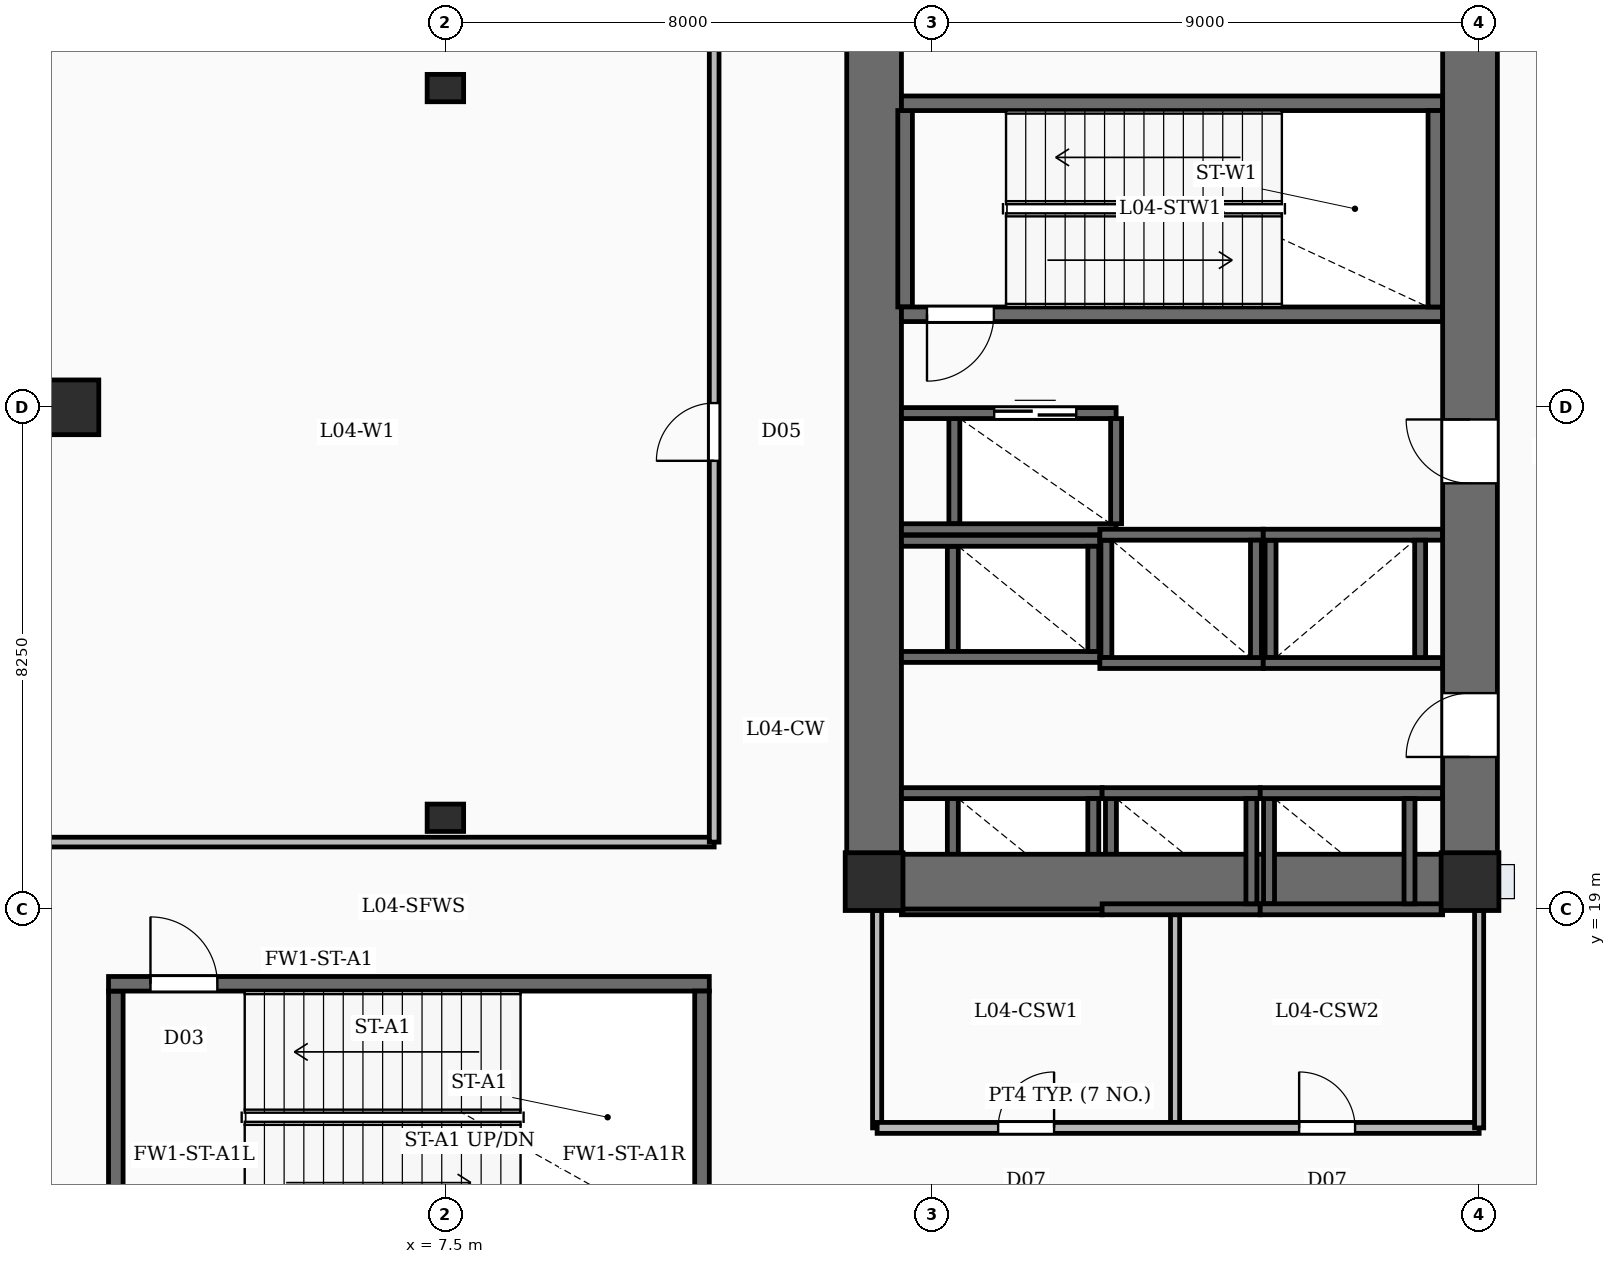
"""IFC4 building model, lengths in metres.
Left out: names, types, materials, properties, quantities, classifications, styles, units other than length and angle.
Written with IfcOpenShell. Run it as: python <this file> out.ifc"""

import sys

from ifc_helpers import new_model, si_unit, direction, frame, frame_2d, origin, origin_2d, place, context, subcontext, project, spatial, rectangle, extrude, element, fill, save


model = new_model("IFC4")
c1 = context("Model", 3, precision=1e-05, world=origin(), true_north=direction((0.0, 1.0)))
c2 = subcontext(c1, "Body", "Model", "MODEL_VIEW")
j1 = project(units=[si_unit("LENGTHUNIT", "METRE"), si_unit("PLANEANGLEUNIT", "RADIAN")], contexts=[c1])
p1 = place(None, origin())
s1 = spatial("IfcSite", under=j1, at=p1, CompositionType="ELEMENT")
p2 = place(p1, origin())
s2 = spatial("IfcBuilding", under=s1, at=p2, CompositionType="ELEMENT")
p3 = place(p2, frame((0.0, 0.0, 23.0)))
s3 = spatial("IfcBuildingStorey", under=s2, at=p3, CompositionType="ELEMENT", Elevation=23.0)
p4 = place(p3, frame((14.55, 19.0, -0.35), z_axis=(0.0, 0.0, 1.0), x_axis=(0.0, 1.0, 0.0)))
e1 = element("IfcWall", 1, at=p4, inside=s3, PredefinedType="SHEAR", context=c2, shape_type="SweptSolid", body=[
    extrude(rectangle(XDim=15.3, YDim=0.9, at=frame_2d((7.65, 0.0))), origin(), (0.0, 0.0, 1.0), 5.0),
])
p5 = place(p3, frame((24.35, 19.0, -0.35), z_axis=(0.0, 0.0, 1.0), x_axis=(0.0, 1.0, 0.0)))
e2 = element("IfcWall", 2, at=p5, inside=s3, PredefinedType="SHEAR", context=c2, shape_type="SweptSolid", body=[
    extrude(rectangle(XDim=15.3, YDim=0.9, at=frame_2d((7.65, 0.0))), origin(), (0.0, 0.0, 1.0), 5.0),
])
p6 = place(p5, frame((2.5, 0.0, 0.35)))
e3 = element("IfcOpeningElement", 3, at=p6, cuts=e2, PredefinedType="OPENING", context=c2, shape_type="SweptSolid", body=[
    extrude(rectangle(XDim=1.05, YDim=2.15, at=frame_2d((0.525, 1.075))), frame((0.0, 0.46, 0.0), z_axis=(0.0, -1.0, 0.0), x_axis=(1.0, 0.0, 0.0)), (0.0, 0.0, 1.0), 0.92),
])
p7 = place(p5, frame((7.0, 0.0, 0.35)))
e4 = element("IfcOpeningElement", 4, at=p7, cuts=e2, PredefinedType="OPENING", context=c2, shape_type="SweptSolid", body=[
    extrude(rectangle(XDim=1.05, YDim=2.15, at=frame_2d((0.525, 1.075))), frame((0.0, 0.46, 0.0), z_axis=(0.0, -1.0, 0.0), x_axis=(1.0, 0.0, 0.0)), (0.0, 0.0, 1.0), 0.92),
])
p8 = place(p3, frame((15.0, 19.45, -0.35), z_axis=(0.0, 0.0, 1.0), x_axis=(1.0, 0.0, 0.0)))
e5 = element("IfcWall", 5, at=p8, inside=s3, PredefinedType="SHEAR", context=c2, shape_type="SweptSolid", body=[
    extrude(rectangle(XDim=8.9, YDim=0.9, at=frame_2d((4.45, 0.0))), origin(), (0.0, 0.0, 1.0), 5.0),
])
for number, where, z_axis, x_axis in (
    (6, (14.55, 19.45, -0.35), (0.0, 0.0, 1.0), (1.0, 0.0, 0.0)),
    (7, (24.35, 19.45, -0.35), (0.0, 0.0, 1.0), (1.0, 0.0, 0.0)),
):
    element("IfcColumn", number, at=place(p3, frame(where, z_axis=z_axis, x_axis=x_axis)), inside=s3, PredefinedType="COLUMN", context=c2, shape_type="SweptSolid", body=[
        extrude(rectangle(XDim=0.95, YDim=0.95, at=origin_2d()), origin(), (0.0, 0.0, 1.0), 5.0),
    ])
p9 = place(p3, frame((1.2, 27.25, -0.35), z_axis=(0.0, 0.0, 1.0), x_axis=(1.0, 0.0, 0.0)))
e8 = element("IfcColumn", 8, at=p9, inside=s3, PredefinedType="COLUMN", context=c2, shape_type="SweptSolid", body=[
    extrude(rectangle(XDim=1.2, YDim=0.9, at=origin_2d()), origin(), (0.0, 0.0, 1.0), 5.0),
])
for number, where, z_axis, x_axis in (
    (9, (7.5, 20.5, -0.35), (0.0, 0.0, 1.0), (1.0, 0.0, 0.0)),
    (10, (7.5, 32.5, -0.35), (0.0, 0.0, 1.0), (1.0, 0.0, 0.0)),
):
    element("IfcColumn", number, at=place(p3, frame(where, z_axis=z_axis, x_axis=x_axis)), inside=s3, PredefinedType="PILASTER", context=c2, shape_type="SweptSolid", body=[
        extrude(rectangle(XDim=0.6, YDim=0.45, at=origin_2d()), origin(), (0.0, 0.0, 1.0), 5.0),
    ])
p10 = place(p3, frame((1.96, 17.77, 0.0), z_axis=(0.0, 0.0, 1.0), x_axis=(1.0, 0.0, 0.0)))
e11 = element("IfcWall", 11, at=p10, inside=s3, PredefinedType="SOLIDWALL", context=c2, shape_type="SweptSolid", body=[
    extrude(rectangle(XDim=9.88, YDim=0.24, at=frame_2d((4.94, 0.0))), origin(), (0.0, 0.0, 1.0), 4.65),
])
p11 = place(p10, frame((0.69, 0.0, 0.0)))
e12 = element("IfcOpeningElement", 12, at=p11, cuts=e11, PredefinedType="OPENING", context=c2, shape_type="SweptSolid", body=[
    extrude(rectangle(XDim=1.1, YDim=2.15, at=frame_2d((0.55, 1.075))), frame((0.0, 0.13, 0.0), z_axis=(0.0, -1.0, 0.0), x_axis=(1.0, 0.0, 0.0)), (0.0, 0.0, 1.0), 0.26),
])
for number, where, z_axis, x_axis in (
    (13, (2.08, 13.5, 0.0), (0.0, 0.0, 1.0), (0.0, 1.0, 0.0)),
    (14, (11.72, 13.5, 0.0), (0.0, 0.0, 1.0), (0.0, 1.0, 0.0)),
):
    element("IfcWall", number, at=place(p3, frame(where, z_axis=z_axis, x_axis=x_axis)), inside=s3, PredefinedType="SOLIDWALL", context=c2, shape_type="SweptSolid", body=[
        extrude(rectangle(XDim=4.15, YDim=0.24, at=frame_2d((2.075, 0.0))), origin(), (0.0, 0.0, 1.0), 4.65),
    ])
p12 = place(p3, frame((23.9, 28.78, 0.0), z_axis=(0.0, 0.0, 1.0), x_axis=(-1.0, 0.0, 0.0)))
e15 = element("IfcWall", 15, at=p12, inside=s3, PredefinedType="SOLIDWALL", context=c2, shape_type="SweptSolid", body=[
    extrude(rectangle(XDim=8.9, YDim=0.24, at=frame_2d((4.45, 0.0))), origin(), (0.0, 0.0, 1.0), 4.65),
])
p13 = place(p12, frame((7.38, 0.0, 0.0)))
e16 = element("IfcOpeningElement", 16, at=p13, cuts=e15, PredefinedType="OPENING", context=c2, shape_type="SweptSolid", body=[
    extrude(rectangle(XDim=1.1, YDim=2.15, at=frame_2d((0.55, 1.075))), frame((0.0, 0.13, 0.0), z_axis=(0.0, -1.0, 0.0), x_axis=(1.0, 0.0, 0.0)), (0.0, 0.0, 1.0), 0.26),
])
p14 = place(p3, frame((15.0, 32.25, 0.0), z_axis=(0.0, 0.0, 1.0), x_axis=(1.0, 0.0, 0.0)))
e17 = element("IfcWall", 17, at=p14, inside=s3, PredefinedType="SOLIDWALL", context=c2, shape_type="SweptSolid", body=[
    extrude(rectangle(XDim=8.9, YDim=0.24, at=frame_2d((4.45, 0.0))), origin(), (0.0, 0.0, 1.0), 4.65),
])
for number, where, z_axis, x_axis in (
    (18, (15.06, 28.9, 0.0), (0.0, 0.0, 1.0), (0.0, 1.0, 0.0)),
    (19, (23.78, 28.9, 0.0), (0.0, 0.0, 1.0), (0.0, 1.0, 0.0)),
):
    element("IfcWall", number, at=place(p3, frame(where, z_axis=z_axis, x_axis=x_axis)), inside=s3, PredefinedType="SOLIDWALL", context=c2, shape_type="SweptSolid", body=[
        extrude(rectangle(XDim=3.23, YDim=0.24, at=frame_2d((1.615, 0.0))), origin(), (0.0, 0.0, 1.0), 4.65),
    ])
for number, where, z_axis, x_axis in (
    (20, (15.0, 20.905, 0.0), (0.0, 0.0, 1.0), (1.0, 0.0, 0.0)),
    (21, (15.0, 18.995, 0.0), (0.0, 0.0, 1.0), (1.0, 0.0, 0.0)),
):
    element("IfcWall", number, at=place(p3, frame(where, z_axis=z_axis, x_axis=x_axis)), inside=s3, PredefinedType="SOLIDWALL", context=c2, shape_type="SweptSolid", body=[
        extrude(rectangle(XDim=3.3, YDim=0.18, at=frame_2d((1.65, 0.0))), origin(), (0.0, 0.0, 1.0), 4.65),
    ])
for number, where, z_axis, x_axis in (
    (22, (15.845, 19.085, 0.0), (0.0, 0.0, 1.0), (0.0, 1.0, 0.0)),
    (23, (18.155, 19.085, 0.0), (0.0, 0.0, 1.0), (0.0, 1.0, 0.0)),
):
    element("IfcWall", number, at=place(p3, frame(where, z_axis=z_axis, x_axis=x_axis)), inside=s3, PredefinedType="SOLIDWALL", context=c2, shape_type="SweptSolid", body=[
        extrude(rectangle(XDim=1.73, YDim=0.18, at=frame_2d((0.865, 0.0))), origin(), (0.0, 0.0, 1.0), 4.65),
    ])
for number, where, z_axis, x_axis in (
    (24, (18.3, 20.905, 0.0), (0.0, 0.0, 1.0), (1.0, 0.0, 0.0)),
    (25, (18.3, 18.995, 0.0), (0.0, 0.0, 1.0), (1.0, 0.0, 0.0)),
):
    element("IfcWall", number, at=place(p3, frame(where, z_axis=z_axis, x_axis=x_axis)), inside=s3, PredefinedType="SOLIDWALL", context=c2, shape_type="SweptSolid", body=[
        extrude(rectangle(XDim=2.6, YDim=0.18, at=frame_2d((1.3, 0.0))), origin(), (0.0, 0.0, 1.0), 4.65),
    ])
for number, where, z_axis, x_axis in (
    (26, (18.445, 19.085, 0.0), (0.0, 0.0, 1.0), (0.0, 1.0, 0.0)),
    (27, (20.755, 19.085, 0.0), (0.0, 0.0, 1.0), (0.0, 1.0, 0.0)),
):
    element("IfcWall", number, at=place(p3, frame(where, z_axis=z_axis, x_axis=x_axis)), inside=s3, PredefinedType="SOLIDWALL", context=c2, shape_type="SweptSolid", body=[
        extrude(rectangle(XDim=1.73, YDim=0.18, at=frame_2d((0.865, 0.0))), origin(), (0.0, 0.0, 1.0), 4.65),
    ])
for number, where, z_axis, x_axis in (
    (28, (20.9, 20.905, 0.0), (0.0, 0.0, 1.0), (1.0, 0.0, 0.0)),
    (29, (20.9, 18.995, 0.0), (0.0, 0.0, 1.0), (1.0, 0.0, 0.0)),
):
    element("IfcWall", number, at=place(p3, frame(where, z_axis=z_axis, x_axis=x_axis)), inside=s3, PredefinedType="SOLIDWALL", context=c2, shape_type="SweptSolid", body=[
        extrude(rectangle(XDim=3.0, YDim=0.18, at=frame_2d((1.5, 0.0))), origin(), (0.0, 0.0, 1.0), 4.65),
    ])
for number, where, z_axis, x_axis in (
    (30, (21.045, 19.085, 0.0), (0.0, 0.0, 1.0), (0.0, 1.0, 0.0)),
    (31, (23.355, 19.085, 0.0), (0.0, 0.0, 1.0), (0.0, 1.0, 0.0)),
):
    element("IfcWall", number, at=place(p3, frame(where, z_axis=z_axis, x_axis=x_axis)), inside=s3, PredefinedType="SOLIDWALL", context=c2, shape_type="SweptSolid", body=[
        extrude(rectangle(XDim=1.73, YDim=0.18, at=frame_2d((0.865, 0.0))), origin(), (0.0, 0.0, 1.0), 4.65),
    ])
for number, where, z_axis, x_axis in (
    (32, (15.0, 25.055, 0.0), (0.0, 0.0, 1.0), (1.0, 0.0, 0.0)),
    (33, (15.0, 23.145, 0.0), (0.0, 0.0, 1.0), (1.0, 0.0, 0.0)),
):
    element("IfcWall", number, at=place(p3, frame(where, z_axis=z_axis, x_axis=x_axis)), inside=s3, PredefinedType="SOLIDWALL", context=c2, shape_type="SweptSolid", body=[
        extrude(rectangle(XDim=3.262, YDim=0.18, at=frame_2d((1.631, 0.0))), origin(), (0.0, 0.0, 1.0), 4.65),
    ])
for number, where, z_axis, x_axis in (
    (34, (15.845, 23.235, 0.0), (0.0, 0.0, 1.0), (0.0, 1.0, 0.0)),
    (35, (18.155, 23.235, 0.0), (0.0, 0.0, 1.0), (0.0, 1.0, 0.0)),
):
    element("IfcWall", number, at=place(p3, frame(where, z_axis=z_axis, x_axis=x_axis)), inside=s3, PredefinedType="SOLIDWALL", context=c2, shape_type="SweptSolid", body=[
        extrude(rectangle(XDim=1.73, YDim=0.18, at=frame_2d((0.865, 0.0))), origin(), (0.0, 0.0, 1.0), 4.65),
    ])
for number, where, z_axis, x_axis in (
    (36, (18.262, 25.155, 0.0), (0.0, 0.0, 1.0), (1.0, 0.0, 0.0)),
    (37, (18.262, 23.045, 0.0), (0.0, 0.0, 1.0), (1.0, 0.0, 0.0)),
):
    element("IfcWall", number, at=place(p3, frame(where, z_axis=z_axis, x_axis=x_axis)), inside=s3, PredefinedType="SOLIDWALL", context=c2, shape_type="SweptSolid", body=[
        extrude(rectangle(XDim=2.688, YDim=0.18, at=frame_2d((1.344, 0.0))), origin(), (0.0, 0.0, 1.0), 4.65),
    ])
for number, where, z_axis, x_axis in (
    (38, (18.37, 23.135, 0.0), (0.0, 0.0, 1.0), (0.0, 1.0, 0.0)),
    (39, (20.83, 23.135, 0.0), (0.0, 0.0, 1.0), (0.0, 1.0, 0.0)),
):
    element("IfcWall", number, at=place(p3, frame(where, z_axis=z_axis, x_axis=x_axis)), inside=s3, PredefinedType="SOLIDWALL", context=c2, shape_type="SweptSolid", body=[
        extrude(rectangle(XDim=1.93, YDim=0.18, at=frame_2d((0.965, 0.0))), origin(), (0.0, 0.0, 1.0), 4.65),
    ])
for number, where, z_axis, x_axis in (
    (40, (20.95, 25.155, 0.0), (0.0, 0.0, 1.0), (1.0, 0.0, 0.0)),
    (41, (20.95, 23.045, 0.0), (0.0, 0.0, 1.0), (1.0, 0.0, 0.0)),
):
    element("IfcWall", number, at=place(p3, frame(where, z_axis=z_axis, x_axis=x_axis)), inside=s3, PredefinedType="SOLIDWALL", context=c2, shape_type="SweptSolid", body=[
        extrude(rectangle(XDim=2.95, YDim=0.18, at=frame_2d((1.475, 0.0))), origin(), (0.0, 0.0, 1.0), 4.65),
    ])
for number, where, z_axis, x_axis in (
    (42, (21.07, 23.135, 0.0), (0.0, 0.0, 1.0), (0.0, 1.0, 0.0)),
    (43, (23.53, 23.135, 0.0), (0.0, 0.0, 1.0), (0.0, 1.0, 0.0)),
):
    element("IfcWall", number, at=place(p3, frame(where, z_axis=z_axis, x_axis=x_axis)), inside=s3, PredefinedType="SOLIDWALL", context=c2, shape_type="SweptSolid", body=[
        extrude(rectangle(XDim=1.93, YDim=0.18, at=frame_2d((0.965, 0.0))), origin(), (0.0, 0.0, 1.0), 4.65),
    ])
p15 = place(p3, frame((15.0, 27.155, 0.0), z_axis=(0.0, 0.0, 1.0), x_axis=(1.0, 0.0, 0.0)))
e44 = element("IfcWall", 44, at=p15, inside=s3, PredefinedType="SOLIDWALL", context=c2, shape_type="SweptSolid", body=[
    extrude(rectangle(XDim=3.53, YDim=0.18, at=frame_2d((1.765, 0.0))), origin(), (0.0, 0.0, 1.0), 4.65),
])
p16 = place(p15, frame((1.525, 0.0, 0.0)))
e45 = element("IfcOpeningElement", 45, at=p16, cuts=e44, PredefinedType="OPENING", context=c2, shape_type="SweptSolid", body=[
    extrude(rectangle(XDim=1.35, YDim=2.3, at=frame_2d((0.675, 1.15))), frame((0.0, 0.1, 0.0), z_axis=(0.0, -1.0, 0.0), x_axis=(1.0, 0.0, 0.0)), (0.0, 0.0, 1.0), 0.2),
])
p17 = place(p3, frame((15.0, 25.245, 0.0), z_axis=(0.0, 0.0, 1.0), x_axis=(1.0, 0.0, 0.0)))
e46 = element("IfcWall", 46, at=p17, inside=s3, PredefinedType="SOLIDWALL", context=c2, shape_type="SweptSolid", body=[
    extrude(rectangle(XDim=3.53, YDim=0.18, at=frame_2d((1.765, 0.0))), origin(), (0.0, 0.0, 1.0), 4.65),
])
for number, where, z_axis, x_axis in (
    (47, (15.87, 25.335, 0.0), (0.0, 0.0, 1.0), (0.0, 1.0, 0.0)),
    (48, (18.53, 25.335, 0.0), (0.0, 0.0, 1.0), (0.0, 1.0, 0.0)),
):
    element("IfcWall", number, at=place(p3, frame(where, z_axis=z_axis, x_axis=x_axis)), inside=s3, PredefinedType="SOLIDWALL", context=c2, shape_type="SweptSolid", body=[
        extrude(rectangle(XDim=1.73, YDim=0.18, at=frame_2d((0.865, 0.0))), origin(), (0.0, 0.0, 1.0), 4.65),
    ])
p18 = place(p3, frame((19.5, 15.4, 0.0), z_axis=(0.0, 0.0, 1.0), x_axis=(0.0, 1.0, 0.0)))
e49 = element("IfcWall", 49, at=p18, inside=s3, PredefinedType="PARTITIONING", context=c2, shape_type="SweptSolid", body=[
    extrude(rectangle(XDim=3.58, YDim=0.15, at=frame_2d((1.79, 0.0))), origin(), (0.0, 0.0, 1.0), 3.71),
])
p19 = place(p3, frame((14.6, 15.4, 0.0), z_axis=(0.0, 0.0, 1.0), x_axis=(1.0, 0.0, 0.0)))
e50 = element("IfcWall", 50, at=p19, inside=s3, PredefinedType="PARTITIONING", context=c2, shape_type="SweptSolid", body=[
    extrude(rectangle(XDim=9.9, YDim=0.18, at=frame_2d((4.95, 0.0))), origin(), (0.0, 0.0, 1.0), 3.71),
])
p20 = place(p19, frame((1.99, 0.0, 0.0)))
e51 = element("IfcOpeningElement", 51, at=p20, cuts=e50, PredefinedType="OPENING", context=c2, shape_type="SweptSolid", body=[
    extrude(rectangle(XDim=0.92, YDim=2.1, at=frame_2d((0.46, 1.05))), frame((0.0, 0.1, 0.0), z_axis=(0.0, -1.0, 0.0), x_axis=(1.0, 0.0, 0.0)), (0.0, 0.0, 1.0), 0.2),
])
p21 = place(p19, frame((6.94, 0.0, 0.0)))
e52 = element("IfcOpeningElement", 52, at=p21, cuts=e50, PredefinedType="OPENING", context=c2, shape_type="SweptSolid", body=[
    extrude(rectangle(XDim=0.92, YDim=2.1, at=frame_2d((0.46, 1.05))), frame((0.0, 0.1, 0.0), z_axis=(0.0, -1.0, 0.0), x_axis=(1.0, 0.0, 0.0)), (0.0, 0.0, 1.0), 0.2),
])
for number, where, z_axis, x_axis in (
    (53, (14.6, 15.4, 0.0), (0.0, 0.0, 1.0), (0.0, 1.0, 0.0)),
    (54, (24.5, 15.4, 0.0), (0.0, 0.0, 1.0), (0.0, 1.0, 0.0)),
):
    element("IfcWall", number, at=place(p3, frame(where, z_axis=z_axis, x_axis=x_axis)), inside=s3, PredefinedType="PARTITIONING", context=c2, shape_type="SweptSolid", body=[
        extrude(rectangle(XDim=3.58, YDim=0.15, at=frame_2d((1.79, 0.0))), origin(), (0.0, 0.0, 1.0), 3.71),
    ])
p22 = place(p3, frame((11.92, 20.1, 0.0), z_axis=(0.0, 0.0, 1.0), x_axis=(0.0, 1.0, 0.0)))
e55 = element("IfcWall", 55, at=p22, inside=s3, PredefinedType="PARTITIONING", context=c2, shape_type="SweptSolid", body=[
    extrude(rectangle(XDim=13.5, YDim=0.16, at=frame_2d((6.75, 0.0))), origin(), (0.0, 0.0, 1.0), 3.71),
])
p23 = place(p22, frame((6.27, 0.0, 0.0)))
e56 = element("IfcOpeningElement", 56, at=p23, cuts=e55, PredefinedType="OPENING", context=c2, shape_type="SweptSolid", body=[
    extrude(rectangle(XDim=0.95, YDim=2.15, at=frame_2d((0.475, 1.075))), frame((0.0, 0.09, 0.0), z_axis=(0.0, -1.0, 0.0), x_axis=(1.0, 0.0, 0.0)), (0.0, 0.0, 1.0), 0.18),
])
p24 = place(p3, frame((0.0, 20.1, 0.0), z_axis=(0.0, 0.0, 1.0), x_axis=(1.0, 0.0, 0.0)))
e57 = element("IfcWall", 57, at=p24, inside=s3, PredefinedType="PARTITIONING", context=c2, shape_type="SweptSolid", body=[
    extrude(rectangle(XDim=11.92, YDim=0.16, at=frame_2d((5.96, 0.0))), origin(), (0.0, 0.0, 1.0), 3.71),
])
p25 = place(p11, origin())
e58 = element("IfcDoor", 58, at=p25, inside=s3, OperationType="SINGLE_SWING_LEFT", PredefinedType="DOOR", context=c2, shape_type="SweptSolid", body=[
    extrude(rectangle(XDim=1.1, YDim=2.15, at=frame_2d((0.55, 1.075))), frame((0.0, 0.025, 0.0), z_axis=(0.0, -1.0, 0.0), x_axis=(1.0, 0.0, 0.0)), (0.0, 0.0, 1.0), 0.05),
])
fill(e12, e58)
p26 = place(p6, origin())
e59 = element("IfcDoor", 59, at=p26, inside=s3, OperationType="SINGLE_SWING_LEFT", PredefinedType="DOOR", context=c2, shape_type="SweptSolid", body=[
    extrude(rectangle(XDim=1.05, YDim=2.15, at=frame_2d((0.525, 1.075))), frame((0.0, 0.025, 0.0), z_axis=(0.0, -1.0, 0.0), x_axis=(1.0, 0.0, 0.0)), (0.0, 0.0, 1.0), 0.05),
])
fill(e3, e59)
p27 = place(p7, origin())
e60 = element("IfcDoor", 60, at=p27, inside=s3, OperationType="SINGLE_SWING_RIGHT", PredefinedType="DOOR", context=c2, shape_type="SweptSolid", body=[
    extrude(rectangle(XDim=1.05, YDim=2.15, at=frame_2d((0.525, 1.075))), frame((0.0, 0.025, 0.0), z_axis=(0.0, -1.0, 0.0), x_axis=(1.0, 0.0, 0.0)), (0.0, 0.0, 1.0), 0.05),
])
fill(e4, e60)
p28 = place(p13, origin())
e61 = element("IfcDoor", 61, at=p28, inside=s3, OperationType="SINGLE_SWING_RIGHT", PredefinedType="DOOR", context=c2, shape_type="SweptSolid", body=[
    extrude(rectangle(XDim=1.1, YDim=2.15, at=frame_2d((0.55, 1.075))), frame((0.0, 0.025, 0.0), z_axis=(0.0, -1.0, 0.0), x_axis=(1.0, 0.0, 0.0)), (0.0, 0.0, 1.0), 0.05),
])
fill(e16, e61)
p29 = place(p16, origin())
e62 = element("IfcDoor", 62, at=p29, inside=s3, OperationType="DOUBLE_DOOR_SLIDING", PredefinedType="DOOR", context=c2, shape_type="SweptSolid", body=[
    extrude(rectangle(XDim=1.35, YDim=2.3, at=frame_2d((0.675, 1.15))), frame((0.0, 0.025, 0.0), z_axis=(0.0, -1.0, 0.0), x_axis=(1.0, 0.0, 0.0)), (0.0, 0.0, 1.0), 0.05),
])
fill(e45, e62)
p30 = place(p20, origin())
e63 = element("IfcDoor", 63, at=p30, inside=s3, OperationType="SINGLE_SWING_RIGHT", PredefinedType="DOOR", context=c2, shape_type="SweptSolid", body=[
    extrude(rectangle(XDim=0.92, YDim=2.1, at=frame_2d((0.46, 1.05))), frame((0.0, 0.025, 0.0), z_axis=(0.0, -1.0, 0.0), x_axis=(1.0, 0.0, 0.0)), (0.0, 0.0, 1.0), 0.05),
])
fill(e51, e63)
p31 = place(p21, origin())
e64 = element("IfcDoor", 64, at=p31, inside=s3, OperationType="SINGLE_SWING_LEFT", PredefinedType="DOOR", context=c2, shape_type="SweptSolid", body=[
    extrude(rectangle(XDim=0.92, YDim=2.1, at=frame_2d((0.46, 1.05))), frame((0.0, 0.025, 0.0), z_axis=(0.0, -1.0, 0.0), x_axis=(1.0, 0.0, 0.0)), (0.0, 0.0, 1.0), 0.05),
])
fill(e52, e64)
p32 = place(p23, origin())
e65 = element("IfcDoor", 65, at=p32, inside=s3, OperationType="SINGLE_SWING_LEFT", PredefinedType="DOOR", context=c2, shape_type="SweptSolid", body=[
    extrude(rectangle(XDim=0.95, YDim=2.15, at=frame_2d((0.475, 1.075))), frame((0.0, 0.025, 0.0), z_axis=(0.0, -1.0, 0.0), x_axis=(1.0, 0.0, 0.0)), (0.0, 0.0, 1.0), 0.05),
])
fill(e56, e65)
save(model, sys.argv[1])
